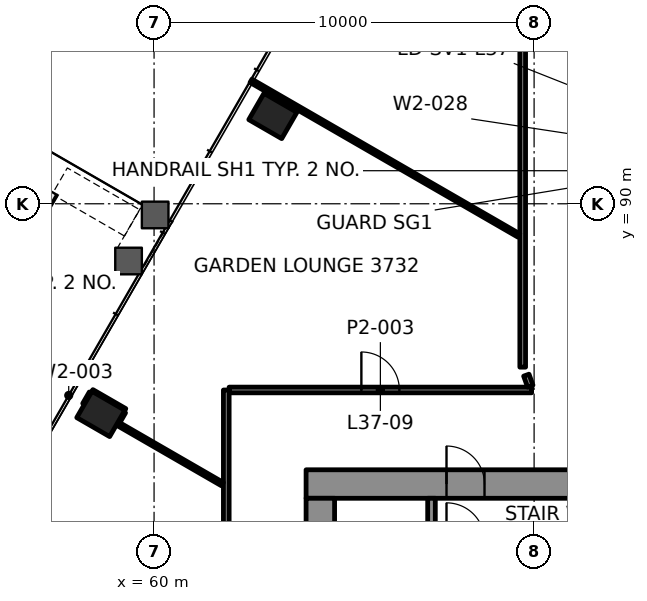
"""IFC4 building model, lengths in metres.
Left out: names, types, materials, properties, quantities, classifications, styles, units other than length and angle.
Written with IfcOpenShell. Run it as: python <this file> out.ifc"""

import sys

from ifc_helpers import new_model, si_unit, direction, frame, frame_2d, origin, origin_2d, place, context, subcontext, project, spatial, rectangle, hollow_rectangle, extrude, element, fill, save


model = new_model("IFC4")
c1 = context("Model", 3, precision=1e-05, world=origin(), true_north=direction((0.0, 1.0)))
c2 = subcontext(c1, "Body", "Model", "MODEL_VIEW")
j1 = project(units=[si_unit("LENGTHUNIT", "METRE"), si_unit("PLANEANGLEUNIT", "RADIAN")], contexts=[c1])
p1 = place(None, origin())
s1 = spatial("IfcSite", under=j1, at=p1, CompositionType="ELEMENT")
p2 = place(p1, origin())
s2 = spatial("IfcBuilding", under=s1, at=p2, CompositionType="ELEMENT")
p3 = place(p2, frame((0.0, 0.0, 163.6)))
s3 = spatial("IfcBuildingStorey", under=s2, at=p3, CompositionType="ELEMENT", Elevation=163.6)
for number, where, z_axis, x_axis in (
    (1, (63.125, 92.31, -0.0), (0.0, 0.0, 1.0), (-0.5, -0.866, 0.0)),
    (2, (58.598, 84.469, -0.0), (0.0, 0.0, 1.0), (-0.5, -0.866, 0.0)),
):
    element("IfcColumn", number, at=place(p3, frame(where, z_axis=z_axis, x_axis=x_axis)), inside=s3, PredefinedType="COLUMN", context=c2, shape_type="SweptSolid", body=[
        extrude(hollow_rectangle(XDim=0.8, YDim=1.0, WallThickness=0.05, at=origin_2d()), origin(), (0.0, 0.0, 1.0), 3.9),
    ])
p4 = place(p3, frame((64.0, 82.625, 0.0), z_axis=(0.0, 0.0, 1.0), x_axis=(1.0, 0.0, 0.0)))
e3 = element("IfcWall", 3, at=p4, inside=s3, PredefinedType="SHEAR", context=c2, shape_type="SweptSolid", body=[
    extrude(rectangle(XDim=22.0, YDim=0.75, at=frame_2d((11.0, 0.0))), origin(), (0.0, 0.0, 1.0), 3.7),
])
p5 = place(p4, frame((3.695, 0.0, 0.0)))
e4 = element("IfcOpeningElement", 4, at=p5, cuts=e3, PredefinedType="OPENING", context=c2, shape_type="SweptSolid", body=[
    extrude(rectangle(XDim=1.0, YDim=2.1, at=frame_2d((0.5, 1.05))), frame((0.0, 0.385, 0.0), z_axis=(0.0, -1.0, 0.0), x_axis=(1.0, 0.0, 0.0)), (0.0, 0.0, 1.0), 0.77),
])
p6 = place(p4, frame((17.505, 0.0, 0.0)))
e5 = element("IfcOpeningElement", 5, at=p6, cuts=e3, PredefinedType="OPENING", context=c2, shape_type="SweptSolid", body=[
    extrude(rectangle(XDim=1.0, YDim=2.1, at=frame_2d((0.5, 1.05))), frame((0.0, 0.385, 0.0), z_axis=(0.0, -1.0, 0.0), x_axis=(1.0, 0.0, 0.0)), (0.0, 0.0, 1.0), 0.77),
])
p7 = place(p4, frame((10.65, 0.0, 0.0)))
e6 = element("IfcOpeningElement", 6, at=p7, cuts=e3, PredefinedType="OPENING", context=c2, shape_type="SweptSolid", body=[
    extrude(rectangle(XDim=0.9, YDim=2.1, at=frame_2d((0.45, 1.05))), frame((0.0, 0.385, 0.0), z_axis=(0.0, -1.0, 0.0), x_axis=(1.0, 0.0, 0.0)), (0.0, 0.0, 1.0), 0.77),
])
p8 = place(p3, frame((64.375, 67.75, 0.0), z_axis=(0.0, 0.0, 1.0), x_axis=(0.0, 1.0, 0.0)))
e7 = element("IfcWall", 7, at=p8, inside=s3, PredefinedType="SHEAR", context=c2, shape_type="SweptSolid", body=[
    extrude(rectangle(XDim=14.5, YDim=0.75, at=frame_2d((7.25, 0.0))), origin(), (0.0, 0.0, 1.0), 3.7),
])
p9 = place(p8, frame((4.65, 0.0, 0.0)))
e8 = element("IfcOpeningElement", 8, at=p9, cuts=e7, PredefinedType="OPENING", context=c2, shape_type="SweptSolid", body=[
    extrude(rectangle(XDim=1.8, YDim=2.1, at=frame_2d((0.9, 1.05))), frame((0.0, 0.385, 0.0), z_axis=(0.0, -1.0, 0.0), x_axis=(1.0, 0.0, 0.0)), (0.0, 0.0, 1.0), 0.77),
])
p10 = place(p8, frame((2.55, 0.0, 0.0)))
e9 = element("IfcOpeningElement", 9, at=p10, cuts=e7, PredefinedType="OPENING", context=c2, shape_type="SweptSolid", body=[
    extrude(rectangle(XDim=0.9, YDim=2.1, at=frame_2d((0.45, 1.05))), frame((0.0, 0.385, 0.0), z_axis=(0.0, -1.0, 0.0), x_axis=(1.0, 0.0, 0.0)), (0.0, 0.0, 1.0), 0.77),
])
p11 = place(p8, frame((10.35, 0.0, 0.0)))
e10 = element("IfcOpeningElement", 10, at=p11, cuts=e7, PredefinedType="OPENING", context=c2, shape_type="SweptSolid", body=[
    extrude(rectangle(XDim=0.9, YDim=2.1, at=frame_2d((0.45, 1.05))), frame((0.0, 0.385, 0.0), z_axis=(0.0, -1.0, 0.0), x_axis=(1.0, 0.0, 0.0)), (0.0, 0.0, 1.0), 0.77),
])
p12 = place(p3, frame((61.976, 85.1, 0.0), z_axis=(0.0, 0.0, 1.0), x_axis=(1.0, 0.0, 0.0)))
e11 = element("IfcWall", 11, at=p12, inside=s3, PredefinedType="PARTITIONING", context=c2, shape_type="SweptSolid", body=[
    extrude(rectangle(XDim=7.958, YDim=0.15, at=frame_2d((3.979, 0.0))), origin(), (0.0, 0.0, 1.0), 3.1),
])
p13 = place(p12, frame((3.479, 0.0, 0.0)))
e12 = element("IfcOpeningElement", 12, at=p13, cuts=e11, PredefinedType="OPENING", context=c2, shape_type="SweptSolid", body=[
    extrude(rectangle(XDim=1.0, YDim=2.1, at=frame_2d((0.5, 1.05))), frame((0.0, 0.085, 0.0), z_axis=(0.0, -1.0, 0.0), x_axis=(1.0, 0.0, 0.0)), (0.0, 0.0, 1.0), 0.17),
])
p14 = place(p3, frame((59.057, 84.263, 0.0), z_axis=(0.0, 0.0, 1.0), x_axis=(0.500264001326, 0.865872928886, 0.0)))
e13 = element("IfcWall", 13, at=p14, inside=s3, PredefinedType="PARTITIONING", context=c2, shape_type="SweptSolid", body=[
    extrude(rectangle(XDim=0.299, YDim=0.1, at=frame_2d((0.149, 0.0))), origin(), (0.0, 0.0, 1.0), 3.1),
])
p15 = place(p3, frame((58.166, 84.72, 0.0), z_axis=(0.0, 0.0, 1.0), x_axis=(0.499601298118, 0.866255472086, 0.0)))
e14 = element("IfcWall", 14, at=p15, inside=s3, PredefinedType="PARTITIONING", context=c2, shape_type="SweptSolid", body=[
    extrude(rectangle(XDim=0.349, YDim=0.1, at=frame_2d((0.174, 0.0))), origin(), (0.0, 0.0, 1.0), 3.1),
])
p16 = place(p3, frame((69.7, 85.7, 0.0), z_axis=(0.0, 0.0, 1.0), x_axis=(0.0, 1.0, 0.0)))
e15 = element("IfcWall", 15, at=p16, inside=s3, PredefinedType="PARTITIONING", context=c2, shape_type="SweptSolid", body=[
    extrude(rectangle(XDim=10.999, YDim=0.15, at=frame_2d((5.5, 0.0))), origin(), (0.0, 0.0, 1.0), 3.022),
])
p17 = place(p3, frame((61.9, 68.476, 0.0), z_axis=(0.0, 0.0, 1.0), x_axis=(0.0, 1.0, 0.0)))
e16 = element("IfcWall", 16, at=p17, inside=s3, PredefinedType="PARTITIONING", context=c2, shape_type="SweptSolid", body=[
    extrude(rectangle(XDim=16.624, YDim=0.15, at=frame_2d((8.312, 0.0))), origin(), (0.0, 0.0, 1.0), 3.1),
])
p18 = place(p17, frame((8.064, 0.0, 0.0)))
e17 = element("IfcOpeningElement", 17, at=p18, cuts=e16, PredefinedType="OPENING", context=c2, shape_type="SweptSolid", body=[
    extrude(rectangle(XDim=1.0, YDim=2.1, at=frame_2d((0.5, 1.05))), frame((0.0, 0.085, 0.0), z_axis=(0.0, -1.0, 0.0), x_axis=(1.0, 0.0, 0.0)), (0.0, 0.0, 1.0), 0.17),
])
p19 = place(p3, frame((69.899, 85.2, 0.0), z_axis=(0.0, 0.0, 1.0), x_axis=(-0.33638665492, 0.941723960825, 0.0)))
e18 = element("IfcWall", 18, at=p19, inside=s3, PredefinedType="PARTITIONING", context=c2, shape_type="SweptSolid", body=[
    extrude(rectangle(XDim=0.308, YDim=0.15, at=frame_2d((0.154, 0.0))), origin(), (0.0, 0.0, 1.0), 3.1),
])
p20 = place(p3, frame((69.599, 89.166, 0.0), z_axis=(0.0, 0.0, 1.0), x_axis=(-0.866026732215, 0.499997699084, 0.0)))
e19 = element("IfcWall", 19, at=p20, inside=s3, PredefinedType="PARTITIONING", context=c2, shape_type="SweptSolid", body=[
    extrude(rectangle(XDim=8.139, YDim=0.1, at=frame_2d((4.069, 0.0))), origin(), (0.0, 0.0, 1.0), 2.865),
])
p21 = place(p3, frame((59.231, 84.566, 0.0), z_axis=(0.0, 0.0, 1.0), x_axis=(-0.866039090965, 0.499976292358, 0.0)))
e20 = element("IfcWall", 20, at=p21, inside=s3, PredefinedType="PARTITIONING", context=c2, shape_type="SweptSolid", body=[
    extrude(rectangle(XDim=0.999, YDim=0.1, at=frame_2d((0.5, 0.0))), origin(), (0.0, 0.0, 1.0), 2.865),
])
p22 = place(p3, frame((61.799, 82.622, 0.0), z_axis=(0.0, 0.0, 1.0), x_axis=(-0.866015079179, 0.500017882314, 0.0)))
e21 = element("IfcWall", 21, at=p22, inside=s3, PredefinedType="PARTITIONING", context=c2, shape_type="SweptSolid", body=[
    extrude(rectangle(XDim=3.195, YDim=0.1, at=frame_2d((1.598, 0.0))), origin(), (0.0, 0.0, 1.0), 3.1),
])
p23 = place(p3, frame((59.423, 89.497, 0.0), z_axis=(0.0, 0.0, 1.0), x_axis=(-0.86605622881, 0.499946605688, 0.0)))
e22 = element("IfcWall", 22, at=p23, inside=s3, PredefinedType="SOLIDWALL", context=c2, shape_type="SweptSolid", body=[
    extrude(rectangle(XDim=2.2, YDim=0.8, at=frame_2d((1.1, 0.0))), origin(), (0.0, 0.0, 1.0), 0.9),
])
p24 = place(p3, frame((67.3, 81.28, 0.0), z_axis=(0.0, 0.0, 1.0), x_axis=(0.0, 1.0, 0.0)))
e23 = element("IfcWall", 23, at=p24, inside=s3, PredefinedType="PARTITIONING", context=c2, shape_type="SweptSolid", body=[
    extrude(rectangle(XDim=0.97, YDim=0.2, at=frame_2d((0.485, 0.0))), origin(), (0.0, 0.0, 1.0), 3.7),
])
p25 = place(p13, origin())
e24 = element("IfcDoor", 24, at=p25, inside=s3, OperationType="SINGLE_SWING_LEFT", PredefinedType="DOOR", context=c2, shape_type="SweptSolid", body=[
    extrude(rectangle(XDim=1.0, YDim=2.1, at=frame_2d((0.5, 1.05))), frame((0.0, 0.025, 0.0), z_axis=(0.0, -1.0, 0.0), x_axis=(1.0, 0.0, 0.0)), (0.0, 0.0, 1.0), 0.05),
])
fill(e12, e24)
p26 = place(p5, origin())
e25 = element("IfcDoor", 25, at=p26, inside=s3, OperationType="SINGLE_SWING_LEFT", PredefinedType="DOOR", context=c2, shape_type="SweptSolid", body=[
    extrude(rectangle(XDim=1.0, YDim=2.1, at=frame_2d((0.5, 1.05))), frame((0.0, 0.095, 0.0), z_axis=(0.0, -1.0, 0.0), x_axis=(1.0, 0.0, 0.0)), (0.0, 0.0, 1.0), 0.19),
])
fill(e4, e25)
save(model, sys.argv[1])
